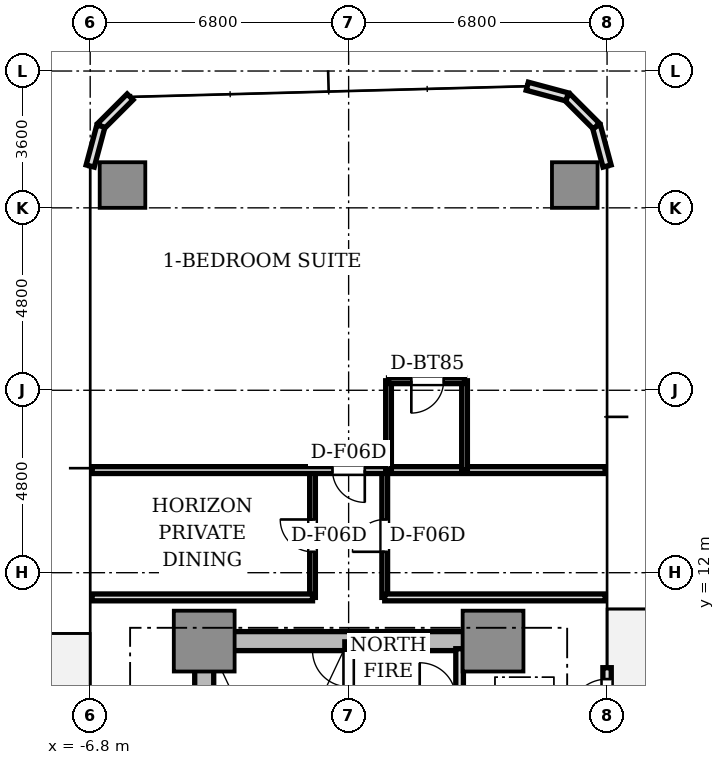
"""IFC4 building model, lengths in metres.
Left out: names, types, materials, properties, quantities, classifications, styles, units other than length and angle.
Written with IfcOpenShell. Run it as: python <this file> out.ifc"""

import sys

from ifc_helpers import new_model, si_unit, direction, frame, frame_2d, origin, origin_2d, place, context, subcontext, project, spatial, rectangle, extrude, source, transform, mapped, element, fill, save


model = new_model("IFC4")
c1 = context("Model", 3, precision=1e-05, world=origin(), true_north=direction((0.0, 1.0)))
c2 = subcontext(c1, "Body", "Model", "MODEL_VIEW")
j1 = project(units=[si_unit("LENGTHUNIT", "METRE"), si_unit("PLANEANGLEUNIT", "RADIAN")], contexts=[c1])
p1 = place(None, origin())
s1 = spatial("IfcSite", under=j1, at=p1, CompositionType="ELEMENT")
p2 = place(p1, origin())
s2 = spatial("IfcBuilding", under=s1, at=p2, CompositionType="ELEMENT")
p3 = place(p2, frame((0.0, 0.0, 39.85)))
s3 = spatial("IfcBuildingStorey", under=s2, at=p3, CompositionType="ELEMENT", Elevation=39.85)
p4 = place(p3, frame((-3.55, 10.2, 0.0), z_axis=(0.0, 0.0, 1.0), x_axis=(1.0, 0.0, 0.0)))
e1 = element("IfcWall", 1, at=p4, inside=s3, PredefinedType="SHEAR", context=c2, shape_type="SweptSolid", body=[
    extrude(rectangle(XDim=7.1, YDim=0.5, at=frame_2d((3.55, 0.0))), origin(), (0.0, 0.0, 1.0), 3.11),
])
p5 = place(p3, frame((-3.8, 2.85, 0.0), z_axis=(0.0, 0.0, 1.0), x_axis=(0.0, 1.0, 0.0)))
e2 = element("IfcWall", 2, at=p5, inside=s3, PredefinedType="SHEAR", context=c2, shape_type="SweptSolid", body=[
    extrude(rectangle(XDim=6.9, YDim=0.5, at=frame_2d((3.45, 0.0))), origin(), (0.0, 0.0, 1.0), 3.11),
])
m1 = source(origin(), c2, "Body", "SweptSolid", [
    extrude(rectangle(XDim=1.6, YDim=1.6, at=origin_2d()), origin(), (0.0, 0.0, 1.0), 3.11),
])
for number, where, z_axis, x_axis in (
    (3, (-3.8, 10.2, 0.0), (0.0, 0.0, 1.0), (1.0, 0.0, 0.0)),
    (4, (3.8, 10.2, 0.0), (0.0, 0.0, 1.0), (1.0, 0.0, 0.0)),
):
    element("IfcColumn", number, at=place(p3, frame(where, z_axis=z_axis, x_axis=x_axis)), inside=s3, PredefinedType="COLUMN", context=c2, shape_type="MappedRepresentation", body=[
        mapped(m1, transform((0.0, 0.0, 0.0), scale=1.0)),
    ])
m2 = source(origin(), c2, "Body", "SweptSolid", [
    extrude(rectangle(XDim=1.2, YDim=1.2, at=origin_2d()), origin(), (0.0, 0.0, 1.0), 3.11),
])
for number, where, z_axis, x_axis in (
    (5, (5.95, 22.2, 0.0), (0.0, 0.0, 1.0), (1.0, 0.0, 0.0)),
    (6, (-5.95, 22.2, 0.0), (0.0, 0.0, 1.0), (1.0, 0.0, 0.0)),
):
    element("IfcColumn", number, at=place(p3, frame(where, z_axis=z_axis, x_axis=x_axis)), inside=s3, PredefinedType="COLUMN", context=c2, shape_type="MappedRepresentation", body=[
        mapped(m2, transform((0.0, 0.0, 0.0), scale=1.0)),
    ])
p6 = place(p3, frame((6.8, 6.8, 0.0), z_axis=(0.0, 0.0, 1.0), x_axis=(0.0, 1.0, 0.0)))
e7 = element("IfcWall", 7, at=p6, inside=s3, PredefinedType="STANDARD", context=c2, shape_type="SweptSolid", body=[
    extrude(rectangle(XDim=2.7, YDim=0.22, at=frame_2d((1.35, 0.0))), origin(), (0.0, 0.0, 1.0), 3.11),
])
p7 = place(p6, frame((1.4, 0.0, 0.0)))
e8 = element("IfcOpeningElement", 8, at=p7, cuts=e7, PredefinedType="OPENING", context=c2, shape_type="SweptSolid", body=[
    extrude(rectangle(XDim=1.0, YDim=2.2, at=frame_2d((0.5, 1.1))), frame((0.0, 0.12, 0.0), z_axis=(0.0, -1.0, 0.0), x_axis=(1.0, 0.0, 0.0)), (0.0, 0.0, 1.0), 0.24),
])
for number, where, z_axis, x_axis in (
    (9, (6.8, 22.7, 0.0), (0.0, 0.0, 1.0), (-0.259, 0.966, 0.0)),
    (10, (6.519, 23.75, 0.0), (0.0, 0.0, 1.0), (-0.707, 0.707, 0.0)),
    (11, (5.75, 24.519, 0.0), (0.0, 0.0, 1.0), (-0.966, 0.259, 0.0)),
    (12, (-5.75, 24.519, 0.0), (0.0, 0.0, 1.0), (-0.707, -0.707, 0.0)),
    (13, (-6.519, 23.75, 0.0), (0.0, 0.0, 1.0), (-0.259, -0.966, 0.0)),
):
    element("IfcWall", number, at=place(p3, frame(where, z_axis=z_axis, x_axis=x_axis)), inside=s3, PredefinedType="STANDARD", context=c2, shape_type="SweptSolid", body=[
        extrude(rectangle(XDim=1.087, YDim=0.22, at=frame_2d((0.543, 0.0))), origin(), (0.0, 0.0, 1.0), 3.11),
    ])
p8 = place(p3, frame((0.0, 2.5, 0.0), z_axis=(0.0, 0.0, 1.0), x_axis=(0.0, 1.0, 0.0)))
e14 = element("IfcWall", 14, at=p8, inside=s3, PredefinedType="SOLIDWALL", context=c2, shape_type="SweptSolid", body=[
    extrude(rectangle(XDim=7.68, YDim=0.2, at=frame_2d((3.84, 0.0))), origin(), (0.0, 0.0, 1.0), 3.11),
])
p9 = place(p8, frame((6.5, 0.0, 0.0)))
e15 = element("IfcOpeningElement", 15, at=p9, cuts=e14, PredefinedType="OPENING", context=c2, shape_type="SweptSolid", body=[
    extrude(rectangle(XDim=0.95, YDim=2.15, at=frame_2d((0.475, 1.075))), frame((0.0, 0.11, 0.0), z_axis=(0.0, -1.0, 0.0), x_axis=(1.0, 0.0, 0.0)), (0.0, 0.0, 1.0), 0.22),
])
p10 = place(p3, frame((2.92, 8.68, 0.0), z_axis=(0.0, 0.0, 1.0), x_axis=(0.0, 1.0, 0.0)))
e16 = element("IfcWall", 16, at=p10, inside=s3, PredefinedType="SOLIDWALL", context=c2, shape_type="SweptSolid", body=[
    extrude(rectangle(XDim=1.32, YDim=0.2, at=frame_2d((0.66, 0.0))), origin(), (0.0, 0.0, 1.0), 2.66),
])
p11 = place(p3, frame((-0.95, 11.35, 0.0), z_axis=(0.0, 0.0, 1.0), x_axis=(0.0, 1.0, 0.0)))
e17 = element("IfcWall", 17, at=p11, inside=s3, PredefinedType="PARTITIONING", context=c2, shape_type="SweptSolid", body=[
    extrude(rectangle(XDim=3.35, YDim=0.15, at=frame_2d((1.675, 0.0))), origin(), (0.0, 0.0, 1.0), 2.66),
])
p12 = place(p11, frame((1.2, 0.0, 0.0)))
e18 = element("IfcOpeningElement", 18, at=p12, cuts=e17, PredefinedType="OPENING", context=c2, shape_type="SweptSolid", body=[
    extrude(rectangle(XDim=0.85, YDim=2.1, at=frame_2d((0.425, 1.05))), frame((0.0, 0.085, 0.0), z_axis=(0.0, -1.0, 0.0), x_axis=(1.0, 0.0, 0.0)), (0.0, 0.0, 1.0), 0.17),
])
p13 = place(p3, frame((0.95, 11.35, 0.0), z_axis=(0.0, 0.0, 1.0), x_axis=(0.0, 1.0, 0.0)))
e19 = element("IfcWall", 19, at=p13, inside=s3, PredefinedType="PARTITIONING", context=c2, shape_type="SweptSolid", body=[
    extrude(rectangle(XDim=3.35, YDim=0.15, at=frame_2d((1.675, 0.0))), origin(), (0.0, 0.0, 1.0), 2.66),
])
p14 = place(p13, frame((1.2, 0.0, 0.0)))
e20 = element("IfcOpeningElement", 20, at=p14, cuts=e19, PredefinedType="OPENING", context=c2, shape_type="SweptSolid", body=[
    extrude(rectangle(XDim=0.85, YDim=2.1, at=frame_2d((0.425, 1.05))), frame((0.0, 0.085, 0.0), z_axis=(0.0, -1.0, 0.0), x_axis=(1.0, 0.0, 0.0)), (0.0, 0.0, 1.0), 0.17),
])
for number, where, z_axis, x_axis in (
    (21, (-0.95, 11.35, 0.0), (0.0, 0.0, 1.0), (-1.0, 0.0, 0.0)),
    (22, (6.75, 11.35, 0.0), (0.0, 0.0, 1.0), (-1.0, 0.0, 0.0)),
):
    element("IfcWall", number, at=place(p3, frame(where, z_axis=z_axis, x_axis=x_axis)), inside=s3, PredefinedType="PARTITIONING", context=c2, shape_type="SweptSolid", body=[
        extrude(rectangle(XDim=5.8, YDim=0.18, at=frame_2d((2.9, 0.0))), origin(), (0.0, 0.0, 1.0), 2.66),
    ])
p15 = place(p3, frame((6.75, 14.7, 0.0), z_axis=(0.0, 0.0, 1.0), x_axis=(-1.0, 0.0, 0.0)))
e23 = element("IfcWall", 23, at=p15, inside=s3, PredefinedType="PARTITIONING", context=c2, shape_type="SweptSolid", body=[
    extrude(rectangle(XDim=13.5, YDim=0.18, at=frame_2d((6.75, 0.0))), origin(), (0.0, 0.0, 1.0), 2.66),
])
p16 = place(p15, frame((6.325, 0.0, 0.0)))
e24 = element("IfcOpeningElement", 24, at=p16, cuts=e23, PredefinedType="OPENING", context=c2, shape_type="SweptSolid", body=[
    extrude(rectangle(XDim=0.85, YDim=2.1, at=frame_2d((0.425, 1.05))), frame((0.0, 0.1, 0.0), z_axis=(0.0, -1.0, 0.0), x_axis=(1.0, 0.0, 0.0)), (0.0, 0.0, 1.0), 0.2),
])
for number, where, z_axis, x_axis in (
    (25, (1.05, 14.7, 0.0), (0.0, 0.0, 1.0), (0.0, 1.0, 0.0)),
    (26, (3.05, 14.7, 0.0), (0.0, 0.0, 1.0), (0.0, 1.0, 0.0)),
):
    element("IfcWall", number, at=place(p3, frame(where, z_axis=z_axis, x_axis=x_axis)), inside=s3, PredefinedType="PARTITIONING", context=c2, shape_type="SweptSolid", body=[
        extrude(rectangle(XDim=2.35, YDim=0.15, at=frame_2d((1.175, 0.0))), origin(), (0.0, 0.0, 1.0), 2.66),
    ])
p17 = place(p3, frame((3.05, 17.05, 0.0), z_axis=(0.0, 0.0, 1.0), x_axis=(-1.0, 0.0, 0.0)))
e27 = element("IfcWall", 27, at=p17, inside=s3, PredefinedType="PARTITIONING", context=c2, shape_type="SweptSolid", body=[
    extrude(rectangle(XDim=2.0, YDim=0.15, at=frame_2d((1.0, 0.0))), origin(), (0.0, 0.0, 1.0), 2.66),
])
p18 = place(p17, frame((0.55, 0.0, 0.0)))
e28 = element("IfcOpeningElement", 28, at=p18, cuts=e27, PredefinedType="OPENING", context=c2, shape_type="SweptSolid", body=[
    extrude(rectangle(XDim=0.85, YDim=2.1, at=frame_2d((0.425, 1.05))), frame((0.0, 0.085, 0.0), z_axis=(0.0, -1.0, 0.0), x_axis=(1.0, 0.0, 0.0)), (0.0, 0.0, 1.0), 0.17),
])
m3 = source(origin(), c2, "Body", "SweptSolid", [
    extrude(rectangle(XDim=1.0, YDim=0.05, at=origin_2d()), origin(), (0.0, 0.0, 1.0), 2.2),
])
p19 = place(p7, frame((0.5, 0.0, 0.0)))
e29 = element("IfcDoor", 29, at=p19, inside=s3, OperationType="SINGLE_SWING_LEFT", PredefinedType="DOOR", context=c2, shape_type="MappedRepresentation", body=[
    mapped(m3, transform((0.0, 0.0, 0.0), scale=1.0)),
])
fill(e8, e29)
m4 = source(origin(), c2, "Body", "SweptSolid", [
    extrude(rectangle(XDim=0.95, YDim=0.05, at=origin_2d()), origin(), (0.0, 0.0, 1.0), 2.15),
])
p20 = place(p9, frame((0.475, 0.0, 0.0)))
e30 = element("IfcDoor", 30, at=p20, inside=s3, OperationType="SINGLE_SWING_RIGHT", PredefinedType="DOOR", context=c2, shape_type="MappedRepresentation", body=[
    mapped(m4, transform((0.0, 0.0, 0.0), scale=1.0)),
])
fill(e15, e30)
m5 = source(origin(), c2, "Body", "SweptSolid", [
    extrude(rectangle(XDim=0.85, YDim=0.05, at=origin_2d()), origin(), (0.0, 0.0, 1.0), 2.1),
])
p21 = place(p12, frame((0.425, 0.0, 0.0)))
e31 = element("IfcDoor", 31, at=p21, inside=s3, OperationType="SINGLE_SWING_RIGHT", PredefinedType="DOOR", context=c2, shape_type="MappedRepresentation", body=[
    mapped(m5, transform((0.0, 0.0, 0.0), scale=1.0)),
])
fill(e18, e31)
p22 = place(p14, frame((0.425, 0.0, 0.0)))
e32 = element("IfcDoor", 32, at=p22, inside=s3, OperationType="SINGLE_SWING_LEFT", PredefinedType="DOOR", context=c2, shape_type="MappedRepresentation", body=[
    mapped(m5, transform((0.0, 0.0, 0.0), scale=1.0)),
])
fill(e20, e32)
p23 = place(p18, frame((0.425, 0.0, 0.0)))
e33 = element("IfcDoor", 33, at=p23, inside=s3, OperationType="SINGLE_SWING_RIGHT", PredefinedType="DOOR", context=c2, shape_type="MappedRepresentation", body=[
    mapped(m5, transform((0.0, 0.0, 0.0), scale=1.0)),
])
fill(e28, e33)
p24 = place(p16, frame((0.425, 0.0, 0.0)))
e34 = element("IfcDoor", 34, at=p24, inside=s3, OperationType="SINGLE_SWING_LEFT", PredefinedType="DOOR", context=c2, shape_type="MappedRepresentation", body=[
    mapped(m5, transform((0.0, 0.0, 0.0), scale=1.0)),
])
fill(e24, e34)
save(model, sys.argv[1])
